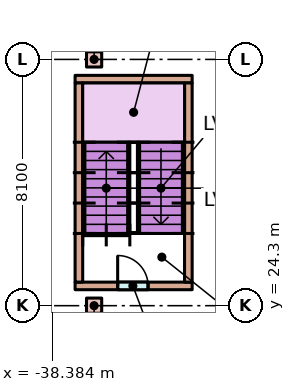
"""IFC4 building model, lengths in metres.
Left out: names, types, materials, properties, quantities, classifications, styles, units other than length and angle.
Written with IfcOpenShell. Run it as: python <this file> out.ifc"""

import sys

from ifc_helpers import new_model, si_unit, direction, frame, frame_2d, origin, origin_2d, place, context, subcontext, project, spatial, rectangle, extrude, element, fill, save


model = new_model("IFC4")
c1 = context("Model", 3, precision=1e-05, world=origin(), true_north=direction((0.0, 1.0)))
c2 = subcontext(c1, "Body", "Model", "MODEL_VIEW")
j1 = project(units=[si_unit("LENGTHUNIT", "METRE"), si_unit("PLANEANGLEUNIT", "RADIAN")], contexts=[c1])
p1 = place(None, origin())
s1 = spatial("IfcSite", under=j1, at=p1, CompositionType="ELEMENT")
p2 = place(p1, origin())
s2 = spatial("IfcBuilding", under=s1, at=p2, CompositionType="ELEMENT")
p3 = place(p2, frame((0.0, 0.0, -3.6)))
s3 = spatial("IfcBuildingStorey", under=s2, at=p3, CompositionType="ELEMENT", Elevation=-3.6)
for number, where, z_axis, x_axis in (
    (1, (-37.0, 24.3, 0.0), (0.0, 0.0, 1.0), (1.0, 0.0, 0.0)),
    (2, (-37.0, 32.4, 0.0), (0.0, 0.0, 1.0), (1.0, 0.0, 0.0)),
):
    element("IfcColumn", number, at=place(p3, frame(where, z_axis=z_axis, x_axis=x_axis)), inside=s3, PredefinedType="COLUMN", context=c2, shape_type="SweptSolid", body=[
        extrude(rectangle(XDim=0.5, YDim=0.5, at=origin_2d()), origin(), (0.0, 0.0, 1.0), 3.6),
    ])
p4 = place(p3, frame((-37.625, 24.95, 0.0), z_axis=(0.0, 0.0, 1.0), x_axis=(1.0, 0.0, 0.0)))
e3 = element("IfcWall", 3, at=p4, inside=s3, PredefinedType="STANDARD", context=c2, shape_type="SweptSolid", body=[
    extrude(rectangle(XDim=3.85, YDim=0.25, at=frame_2d((1.925, 0.0))), origin(), (0.0, 0.0, 1.0), 3.15),
])
p5 = place(p4, frame((1.4, 0.0, 0.0)))
e4 = element("IfcOpeningElement", 4, at=p5, cuts=e3, PredefinedType="OPENING", context=c2, shape_type="SweptSolid", body=[
    extrude(rectangle(XDim=1.0, YDim=2.1, at=frame_2d((0.5, 1.05))), frame((0.0, 0.135, 0.0), z_axis=(0.0, -1.0, 0.0), x_axis=(1.0, 0.0, 0.0)), (0.0, 0.0, 1.0), 0.27),
])
p6 = place(p3, frame((-37.625, 31.75, 0.0), z_axis=(0.0, 0.0, 1.0), x_axis=(1.0, 0.0, 0.0)))
e5 = element("IfcWall", 5, at=p6, inside=s3, PredefinedType="STANDARD", context=c2, shape_type="SweptSolid", body=[
    extrude(rectangle(XDim=3.85, YDim=0.25, at=frame_2d((1.925, 0.0))), origin(), (0.0, 0.0, 1.0), 3.15),
])
for number, where, z_axis, x_axis in (
    (6, (-37.5, 25.075, 0.0), (0.0, 0.0, 1.0), (0.0, 1.0, 0.0)),
    (7, (-33.9, 25.075, 0.0), (0.0, 0.0, 1.0), (0.0, 1.0, 0.0)),
):
    element("IfcWall", number, at=place(p3, frame(where, z_axis=z_axis, x_axis=x_axis)), inside=s3, PredefinedType="STANDARD", context=c2, shape_type="SweptSolid", body=[
        extrude(rectangle(XDim=6.55, YDim=0.25, at=frame_2d((3.275, 0.0))), origin(), (0.0, 0.0, 1.0), 3.15),
    ])
p7 = place(p5, origin())
e8 = element("IfcDoor", 8, at=p7, inside=s3, OperationType="SINGLE_SWING_LEFT", PredefinedType="DOOR", context=c2, shape_type="SweptSolid", body=[
    extrude(rectangle(XDim=1.0, YDim=2.1, at=frame_2d((0.5, 1.05))), frame((0.0, 0.025, 0.0), z_axis=(0.0, -1.0, 0.0), x_axis=(1.0, 0.0, 0.0)), (0.0, 0.0, 1.0), 0.05),
])
fill(e4, e8)
save(model, sys.argv[1])
